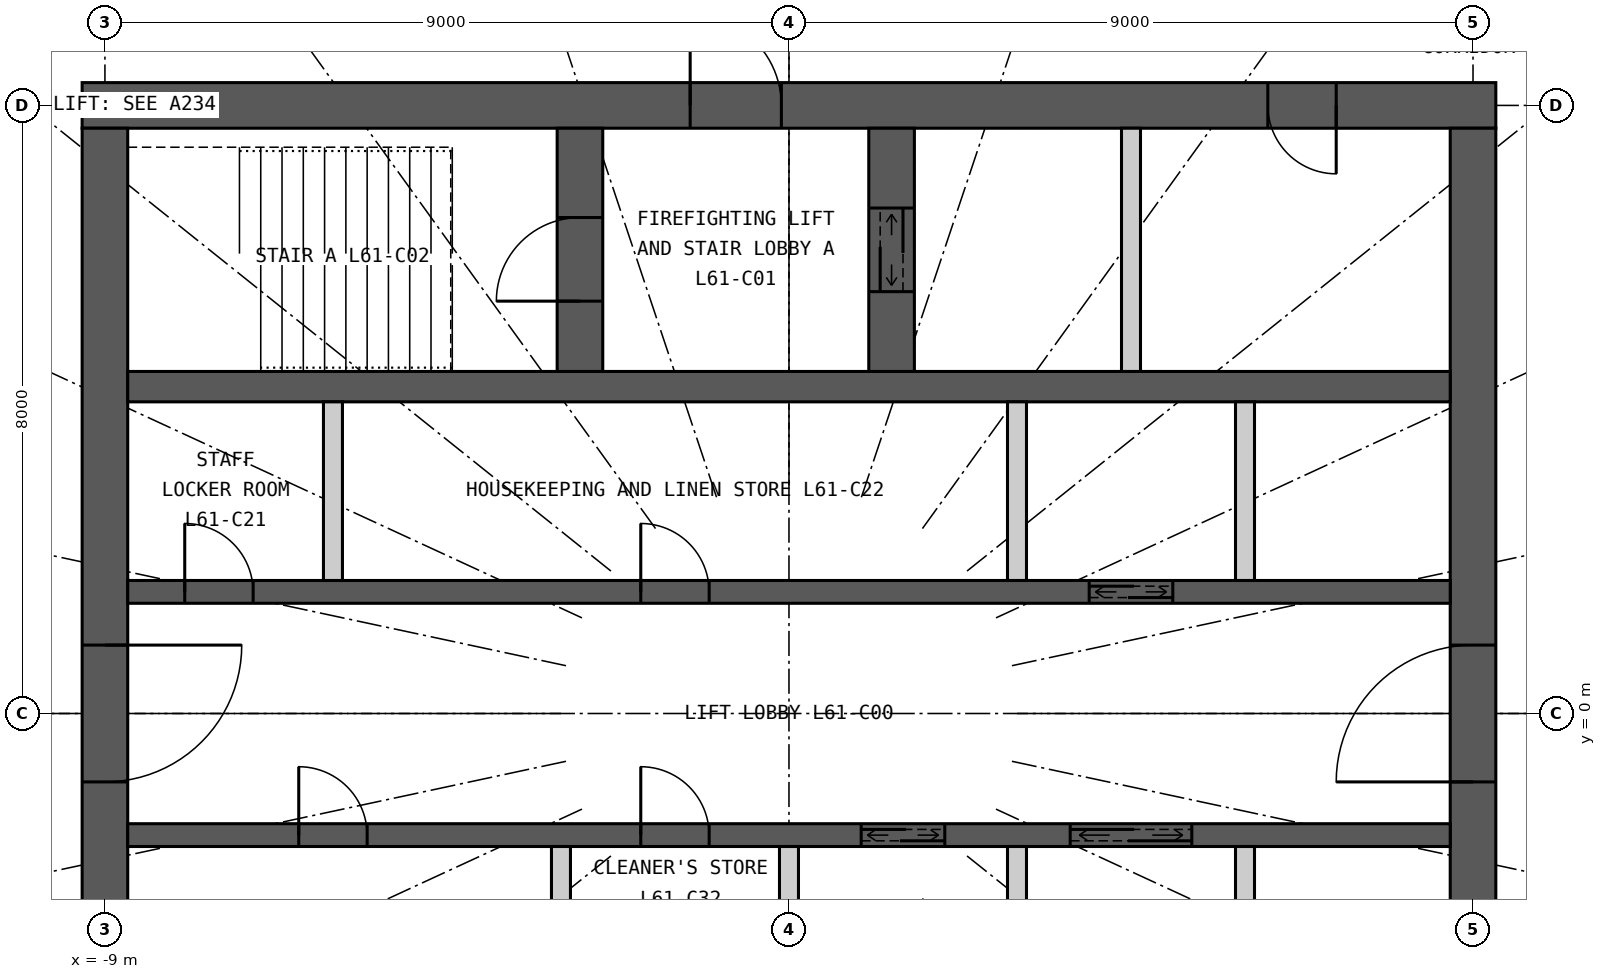
"""IFC4 building model, lengths in metres.
Left out: names, types, materials, properties, quantities, classifications, styles, units other than length and angle.
Written with IfcOpenShell. Run it as: python <this file> out.ifc"""

import sys

from ifc_helpers import new_model, si_unit, direction, frame, frame_2d, origin, place, context, subcontext, project, spatial, rectangle, extrude, element, fill, save


model = new_model("IFC4")
c1 = context("Model", 3, precision=1e-05, world=origin(), true_north=direction((0.0, 1.0)))
c2 = subcontext(c1, "Body", "Model", "MODEL_VIEW")
j1 = project(units=[si_unit("LENGTHUNIT", "METRE"), si_unit("PLANEANGLEUNIT", "RADIAN")], contexts=[c1])
p1 = place(None, origin())
s1 = spatial("IfcSite", under=j1, at=p1, CompositionType="ELEMENT")
p2 = place(p1, origin())
s2 = spatial("IfcBuilding", under=s1, at=p2, CompositionType="ELEMENT")
p3 = place(p2, frame((0.0, 0.0, 225.9)))
s3 = spatial("IfcBuildingStorey", under=s2, at=p3, CompositionType="ELEMENT", Elevation=225.9)
p4 = place(p3, frame((-9.3, 8.0, 0.0), z_axis=(0.0, 0.0, 1.0), x_axis=(1.0, 0.0, 0.0)))
e1 = element("IfcWall", 1, at=p4, inside=s3, PredefinedType="SHEAR", context=c2, shape_type="SweptSolid", body=[
    extrude(rectangle(XDim=18.6, YDim=0.6, at=frame_2d((9.3, 0.0))), origin(), (0.0, 0.0, 1.0), 3.3),
])
p5 = place(p4, frame((8.0, 0.0, 0.0)))
e2 = element("IfcOpeningElement", 2, at=p5, cuts=e1, PredefinedType="OPENING", context=c2, shape_type="SweptSolid", body=[
    extrude(rectangle(XDim=1.2, YDim=2.2, at=frame_2d((0.6, 1.1))), frame((0.0, 0.31, 0.0), z_axis=(0.0, -1.0, 0.0), x_axis=(1.0, 0.0, 0.0)), (0.0, 0.0, 1.0), 0.62),
])
p6 = place(p4, frame((15.6, 0.0, 0.0)))
e3 = element("IfcOpeningElement", 3, at=p6, cuts=e1, PredefinedType="OPENING", context=c2, shape_type="SweptSolid", body=[
    extrude(rectangle(XDim=0.9, YDim=2.2, at=frame_2d((0.45, 1.1))), frame((0.0, 0.31, 0.0), z_axis=(0.0, -1.0, 0.0), x_axis=(1.0, 0.0, 0.0)), (0.0, 0.0, 1.0), 0.62),
])
p7 = place(p3, frame((9.0, -7.7, 0.0), z_axis=(0.0, 0.0, 1.0), x_axis=(0.0, 1.0, 0.0)))
e4 = element("IfcWall", 4, at=p7, inside=s3, PredefinedType="SHEAR", context=c2, shape_type="SweptSolid", body=[
    extrude(rectangle(XDim=15.4, YDim=0.6, at=frame_2d((7.7, 0.0))), origin(), (0.0, 0.0, 1.0), 3.3),
])
p8 = place(p7, frame((6.8, 0.0, 0.0)))
e5 = element("IfcOpeningElement", 5, at=p8, cuts=e4, PredefinedType="OPENING", context=c2, shape_type="SweptSolid", body=[
    extrude(rectangle(XDim=1.8, YDim=2.2, at=frame_2d((0.9, 1.1))), frame((0.0, 0.31, 0.0), z_axis=(0.0, -1.0, 0.0), x_axis=(1.0, 0.0, 0.0)), (0.0, 0.0, 1.0), 0.62),
])
p9 = place(p3, frame((-9.0, 7.7, 0.0), z_axis=(0.0, 0.0, 1.0), x_axis=(0.0, -1.0, 0.0)))
e6 = element("IfcWall", 6, at=p9, inside=s3, PredefinedType="SHEAR", context=c2, shape_type="SweptSolid", body=[
    extrude(rectangle(XDim=15.4, YDim=0.6, at=frame_2d((7.7, 0.0))), origin(), (0.0, 0.0, 1.0), 3.3),
])
p10 = place(p9, frame((6.8, 0.0, 0.0)))
e7 = element("IfcOpeningElement", 7, at=p10, cuts=e6, PredefinedType="OPENING", context=c2, shape_type="SweptSolid", body=[
    extrude(rectangle(XDim=1.8, YDim=2.2, at=frame_2d((0.9, 1.1))), frame((0.0, 0.31, 0.0), z_axis=(0.0, -1.0, 0.0), x_axis=(1.0, 0.0, 0.0)), (0.0, 0.0, 1.0), 0.62),
])
p11 = place(p3, frame((-8.7, 4.3, 0.0), z_axis=(0.0, 0.0, 1.0), x_axis=(1.0, 0.0, 0.0)))
e8 = element("IfcWall", 8, at=p11, inside=s3, PredefinedType="SHEAR", context=c2, shape_type="SweptSolid", body=[
    extrude(rectangle(XDim=17.4, YDim=0.4, at=frame_2d((8.7, 0.0))), origin(), (0.0, 0.0, 1.0), 3.3),
])
p12 = place(p3, frame((-8.7, 1.6, 0.0), z_axis=(0.0, 0.0, 1.0), x_axis=(1.0, 0.0, 0.0)))
e9 = element("IfcWall", 9, at=p12, inside=s3, PredefinedType="SHEAR", context=c2, shape_type="SweptSolid", body=[
    extrude(rectangle(XDim=17.4, YDim=0.3, at=frame_2d((8.7, 0.0))), origin(), (0.0, 0.0, 1.0), 3.3),
])
p13 = place(p12, frame((12.65, 0.0, 0.0)))
e10 = element("IfcOpeningElement", 10, at=p13, cuts=e9, PredefinedType="OPENING", context=c2, shape_type="SweptSolid", body=[
    extrude(rectangle(XDim=1.1, YDim=2.2, at=frame_2d((0.55, 1.1))), frame((0.0, 0.16, 0.0), z_axis=(0.0, -1.0, 0.0), x_axis=(1.0, 0.0, 0.0)), (0.0, 0.0, 1.0), 0.32),
])
p14 = place(p12, frame((0.75, 0.0, 0.0)))
e11 = element("IfcOpeningElement", 11, at=p14, cuts=e9, PredefinedType="OPENING", context=c2, shape_type="SweptSolid", body=[
    extrude(rectangle(XDim=0.9, YDim=2.2, at=frame_2d((0.45, 1.1))), frame((0.0, 0.16, 0.0), z_axis=(0.0, -1.0, 0.0), x_axis=(1.0, 0.0, 0.0)), (0.0, 0.0, 1.0), 0.32),
])
p15 = place(p12, frame((6.75, 0.0, 0.0)))
e12 = element("IfcOpeningElement", 12, at=p15, cuts=e9, PredefinedType="OPENING", context=c2, shape_type="SweptSolid", body=[
    extrude(rectangle(XDim=0.9, YDim=2.2, at=frame_2d((0.45, 1.1))), frame((0.0, 0.16, 0.0), z_axis=(0.0, -1.0, 0.0), x_axis=(1.0, 0.0, 0.0)), (0.0, 0.0, 1.0), 0.32),
])
p16 = place(p3, frame((-8.7, -1.6, 0.0), z_axis=(0.0, 0.0, 1.0), x_axis=(1.0, 0.0, 0.0)))
e13 = element("IfcWall", 13, at=p16, inside=s3, PredefinedType="SHEAR", context=c2, shape_type="SweptSolid", body=[
    extrude(rectangle(XDim=17.4, YDim=0.3, at=frame_2d((8.7, 0.0))), origin(), (0.0, 0.0, 1.0), 3.3),
])
p17 = place(p16, frame((9.65, 0.0, 0.0)))
e14 = element("IfcOpeningElement", 14, at=p17, cuts=e13, PredefinedType="OPENING", context=c2, shape_type="SweptSolid", body=[
    extrude(rectangle(XDim=1.1, YDim=2.2, at=frame_2d((0.55, 1.1))), frame((0.0, 0.16, 0.0), z_axis=(0.0, -1.0, 0.0), x_axis=(1.0, 0.0, 0.0)), (0.0, 0.0, 1.0), 0.32),
])
p18 = place(p16, frame((12.4, 0.0, 0.0)))
e15 = element("IfcOpeningElement", 15, at=p18, cuts=e13, PredefinedType="OPENING", context=c2, shape_type="SweptSolid", body=[
    extrude(rectangle(XDim=1.6, YDim=2.4, at=frame_2d((0.8, 1.2))), frame((0.0, 0.16, 0.0), z_axis=(0.0, -1.0, 0.0), x_axis=(1.0, 0.0, 0.0)), (0.0, 0.0, 1.0), 0.32),
])
p19 = place(p16, frame((2.25, 0.0, 0.0)))
e16 = element("IfcOpeningElement", 16, at=p19, cuts=e13, PredefinedType="OPENING", context=c2, shape_type="SweptSolid", body=[
    extrude(rectangle(XDim=0.9, YDim=2.2, at=frame_2d((0.45, 1.1))), frame((0.0, 0.16, 0.0), z_axis=(0.0, -1.0, 0.0), x_axis=(1.0, 0.0, 0.0)), (0.0, 0.0, 1.0), 0.32),
])
p20 = place(p16, frame((6.75, 0.0, 0.0)))
e17 = element("IfcOpeningElement", 17, at=p20, cuts=e13, PredefinedType="OPENING", context=c2, shape_type="SweptSolid", body=[
    extrude(rectangle(XDim=0.9, YDim=2.2, at=frame_2d((0.45, 1.1))), frame((0.0, 0.16, 0.0), z_axis=(0.0, -1.0, 0.0), x_axis=(1.0, 0.0, 0.0)), (0.0, 0.0, 1.0), 0.32),
])
p21 = place(p3, frame((-2.75, 4.5, 0.0), z_axis=(0.0, 0.0, 1.0), x_axis=(0.0, 1.0, 0.0)))
e18 = element("IfcWall", 18, at=p21, inside=s3, PredefinedType="SHEAR", context=c2, shape_type="SweptSolid", body=[
    extrude(rectangle(XDim=3.2, YDim=0.6, at=frame_2d((1.6, 0.0))), origin(), (0.0, 0.0, 1.0), 3.3),
])
p22 = place(p21, frame((0.925, 0.0, 0.0)))
e19 = element("IfcOpeningElement", 19, at=p22, cuts=e18, PredefinedType="OPENING", context=c2, shape_type="SweptSolid", body=[
    extrude(rectangle(XDim=1.1, YDim=2.2, at=frame_2d((0.55, 1.1))), frame((0.0, 0.31, 0.0), z_axis=(0.0, -1.0, 0.0), x_axis=(1.0, 0.0, 0.0)), (0.0, 0.0, 1.0), 0.62),
])
p23 = place(p3, frame((1.35, 4.5, 0.0), z_axis=(0.0, 0.0, 1.0), x_axis=(0.0, 1.0, 0.0)))
e20 = element("IfcWall", 20, at=p23, inside=s3, PredefinedType="SHEAR", context=c2, shape_type="SweptSolid", body=[
    extrude(rectangle(XDim=3.2, YDim=0.6, at=frame_2d((1.6, 0.0))), origin(), (0.0, 0.0, 1.0), 3.3),
])
p24 = place(p23, frame((1.05, 0.0, 0.0)))
e21 = element("IfcOpeningElement", 21, at=p24, cuts=e20, PredefinedType="OPENING", context=c2, shape_type="SweptSolid", body=[
    extrude(rectangle(XDim=1.1, YDim=2.2, at=frame_2d((0.55, 1.1))), frame((0.0, 0.31, 0.0), z_axis=(0.0, -1.0, 0.0), x_axis=(1.0, 0.0, 0.0)), (0.0, 0.0, 1.0), 0.62),
])
p25 = place(p3, frame((4.5, 4.5, 0.0), z_axis=(0.0, 0.0, 1.0), x_axis=(0.0, 1.0, 0.0)))
e22 = element("IfcWall", 22, at=p25, inside=s3, PredefinedType="PARTITIONING", context=c2, shape_type="SweptSolid", body=[
    extrude(rectangle(XDim=3.2, YDim=0.25, at=frame_2d((1.6, 0.0))), origin(), (0.0, 0.0, 1.0), 3.3),
])
for number, where, z_axis, x_axis in (
    (23, (-6.0, 1.75, 0.0), (0.0, 0.0, 1.0), (0.0, 1.0, 0.0)),
    (24, (3.0, 1.75, 0.0), (0.0, 0.0, 1.0), (0.0, 1.0, 0.0)),
    (25, (6.0, 1.75, 0.0), (0.0, 0.0, 1.0), (0.0, 1.0, 0.0)),
    (26, (-3.0, -4.1, 0.0), (0.0, 0.0, 1.0), (0.0, 1.0, 0.0)),
    (27, (0.0, -4.1, 0.0), (0.0, 0.0, 1.0), (0.0, 1.0, 0.0)),
    (28, (3.0, -4.1, 0.0), (0.0, 0.0, 1.0), (0.0, 1.0, 0.0)),
    (29, (6.0, -4.1, 0.0), (0.0, 0.0, 1.0), (0.0, 1.0, 0.0)),
):
    element("IfcWall", number, at=place(p3, frame(where, z_axis=z_axis, x_axis=x_axis)), inside=s3, PredefinedType="PARTITIONING", context=c2, shape_type="SweptSolid", body=[
        extrude(rectangle(XDim=2.35, YDim=0.25, at=frame_2d((1.175, 0.0))), origin(), (0.0, 0.0, 1.0), 3.3),
    ])
p26 = place(p5, origin())
e30 = element("IfcDoor", 30, at=p26, inside=s3, OperationType="SINGLE_SWING_LEFT", PredefinedType="DOOR", context=c2, shape_type="SweptSolid", body=[
    extrude(rectangle(XDim=1.2, YDim=2.2, at=frame_2d((0.6, 1.1))), frame((0.0, 0.025, 0.0), z_axis=(0.0, -1.0, 0.0), x_axis=(1.0, 0.0, 0.0)), (0.0, 0.0, 1.0), 0.05),
])
fill(e2, e30)
p27 = place(p22, origin())
e31 = element("IfcDoor", 31, at=p27, inside=s3, OperationType="SINGLE_SWING_LEFT", PredefinedType="DOOR", context=c2, shape_type="SweptSolid", body=[
    extrude(rectangle(XDim=1.1, YDim=2.2, at=frame_2d((0.55, 1.1))), frame((0.0, 0.025, 0.0), z_axis=(0.0, -1.0, 0.0), x_axis=(1.0, 0.0, 0.0)), (0.0, 0.0, 1.0), 0.05),
])
fill(e19, e31)
p28 = place(p24, origin())
e32 = element("IfcDoor", 32, at=p28, inside=s3, OperationType="DOUBLE_DOOR_SLIDING", PredefinedType="DOOR", context=c2, shape_type="SweptSolid", body=[
    extrude(rectangle(XDim=1.1, YDim=2.2, at=frame_2d((0.55, 1.1))), frame((0.0, 0.025, 0.0), z_axis=(0.0, -1.0, 0.0), x_axis=(1.0, 0.0, 0.0)), (0.0, 0.0, 1.0), 0.05),
])
fill(e21, e32)
p29 = place(p6, origin())
e33 = element("IfcDoor", 33, at=p29, inside=s3, OperationType="SINGLE_SWING_RIGHT", PredefinedType="DOOR", context=c2, shape_type="SweptSolid", body=[
    extrude(rectangle(XDim=0.9, YDim=2.2, at=frame_2d((0.45, 1.1))), frame((0.0, 0.025, 0.0), z_axis=(0.0, -1.0, 0.0), x_axis=(1.0, 0.0, 0.0)), (0.0, 0.0, 1.0), 0.05),
])
fill(e3, e33)
p30 = place(p13, origin())
e34 = element("IfcDoor", 34, at=p30, inside=s3, OperationType="DOUBLE_DOOR_SLIDING", PredefinedType="DOOR", context=c2, shape_type="SweptSolid", body=[
    extrude(rectangle(XDim=1.1, YDim=2.2, at=frame_2d((0.55, 1.1))), frame((0.0, 0.025, 0.0), z_axis=(0.0, -1.0, 0.0), x_axis=(1.0, 0.0, 0.0)), (0.0, 0.0, 1.0), 0.05),
])
fill(e10, e34)
p31 = place(p17, origin())
e35 = element("IfcDoor", 35, at=p31, inside=s3, OperationType="DOUBLE_DOOR_SLIDING", PredefinedType="DOOR", context=c2, shape_type="SweptSolid", body=[
    extrude(rectangle(XDim=1.1, YDim=2.2, at=frame_2d((0.55, 1.1))), frame((0.0, 0.025, 0.0), z_axis=(0.0, -1.0, 0.0), x_axis=(1.0, 0.0, 0.0)), (0.0, 0.0, 1.0), 0.05),
])
fill(e14, e35)
p32 = place(p18, origin())
e36 = element("IfcDoor", 36, at=p32, inside=s3, OperationType="DOUBLE_DOOR_SLIDING", PredefinedType="DOOR", context=c2, shape_type="SweptSolid", body=[
    extrude(rectangle(XDim=1.6, YDim=2.4, at=frame_2d((0.8, 1.2))), frame((0.0, 0.025, 0.0), z_axis=(0.0, -1.0, 0.0), x_axis=(1.0, 0.0, 0.0)), (0.0, 0.0, 1.0), 0.05),
])
fill(e15, e36)
p33 = place(p14, origin())
e37 = element("IfcDoor", 37, at=p33, inside=s3, OperationType="SINGLE_SWING_LEFT", PredefinedType="DOOR", context=c2, shape_type="SweptSolid", body=[
    extrude(rectangle(XDim=0.9, YDim=2.2, at=frame_2d((0.45, 1.1))), frame((0.0, 0.025, 0.0), z_axis=(0.0, -1.0, 0.0), x_axis=(1.0, 0.0, 0.0)), (0.0, 0.0, 1.0), 0.05),
])
fill(e11, e37)
p34 = place(p15, origin())
e38 = element("IfcDoor", 38, at=p34, inside=s3, OperationType="SINGLE_SWING_LEFT", PredefinedType="DOOR", context=c2, shape_type="SweptSolid", body=[
    extrude(rectangle(XDim=0.9, YDim=2.2, at=frame_2d((0.45, 1.1))), frame((0.0, 0.025, 0.0), z_axis=(0.0, -1.0, 0.0), x_axis=(1.0, 0.0, 0.0)), (0.0, 0.0, 1.0), 0.05),
])
fill(e12, e38)
p35 = place(p19, origin())
e39 = element("IfcDoor", 39, at=p35, inside=s3, OperationType="SINGLE_SWING_LEFT", PredefinedType="DOOR", context=c2, shape_type="SweptSolid", body=[
    extrude(rectangle(XDim=0.9, YDim=2.2, at=frame_2d((0.45, 1.1))), frame((0.0, 0.025, 0.0), z_axis=(0.0, -1.0, 0.0), x_axis=(1.0, 0.0, 0.0)), (0.0, 0.0, 1.0), 0.05),
])
fill(e16, e39)
p36 = place(p20, origin())
e40 = element("IfcDoor", 40, at=p36, inside=s3, OperationType="SINGLE_SWING_LEFT", PredefinedType="DOOR", context=c2, shape_type="SweptSolid", body=[
    extrude(rectangle(XDim=0.9, YDim=2.2, at=frame_2d((0.45, 1.1))), frame((0.0, 0.025, 0.0), z_axis=(0.0, -1.0, 0.0), x_axis=(1.0, 0.0, 0.0)), (0.0, 0.0, 1.0), 0.05),
])
fill(e17, e40)
p37 = place(p8, origin())
e41 = element("IfcDoor", 41, at=p37, inside=s3, OperationType="DOUBLE_DOOR_DOUBLE_SWING", PredefinedType="DOOR", context=c2, shape_type="SweptSolid", body=[
    extrude(rectangle(XDim=1.8, YDim=2.2, at=frame_2d((0.9, 1.1))), frame((0.0, 0.025, 0.0), z_axis=(0.0, -1.0, 0.0), x_axis=(1.0, 0.0, 0.0)), (0.0, 0.0, 1.0), 0.05),
])
fill(e5, e41)
p38 = place(p10, origin())
e42 = element("IfcDoor", 42, at=p38, inside=s3, OperationType="DOUBLE_DOOR_DOUBLE_SWING", PredefinedType="DOOR", context=c2, shape_type="SweptSolid", body=[
    extrude(rectangle(XDim=1.8, YDim=2.2, at=frame_2d((0.9, 1.1))), frame((0.0, 0.025, 0.0), z_axis=(0.0, -1.0, 0.0), x_axis=(1.0, 0.0, 0.0)), (0.0, 0.0, 1.0), 0.05),
])
fill(e7, e42)
save(model, sys.argv[1])
